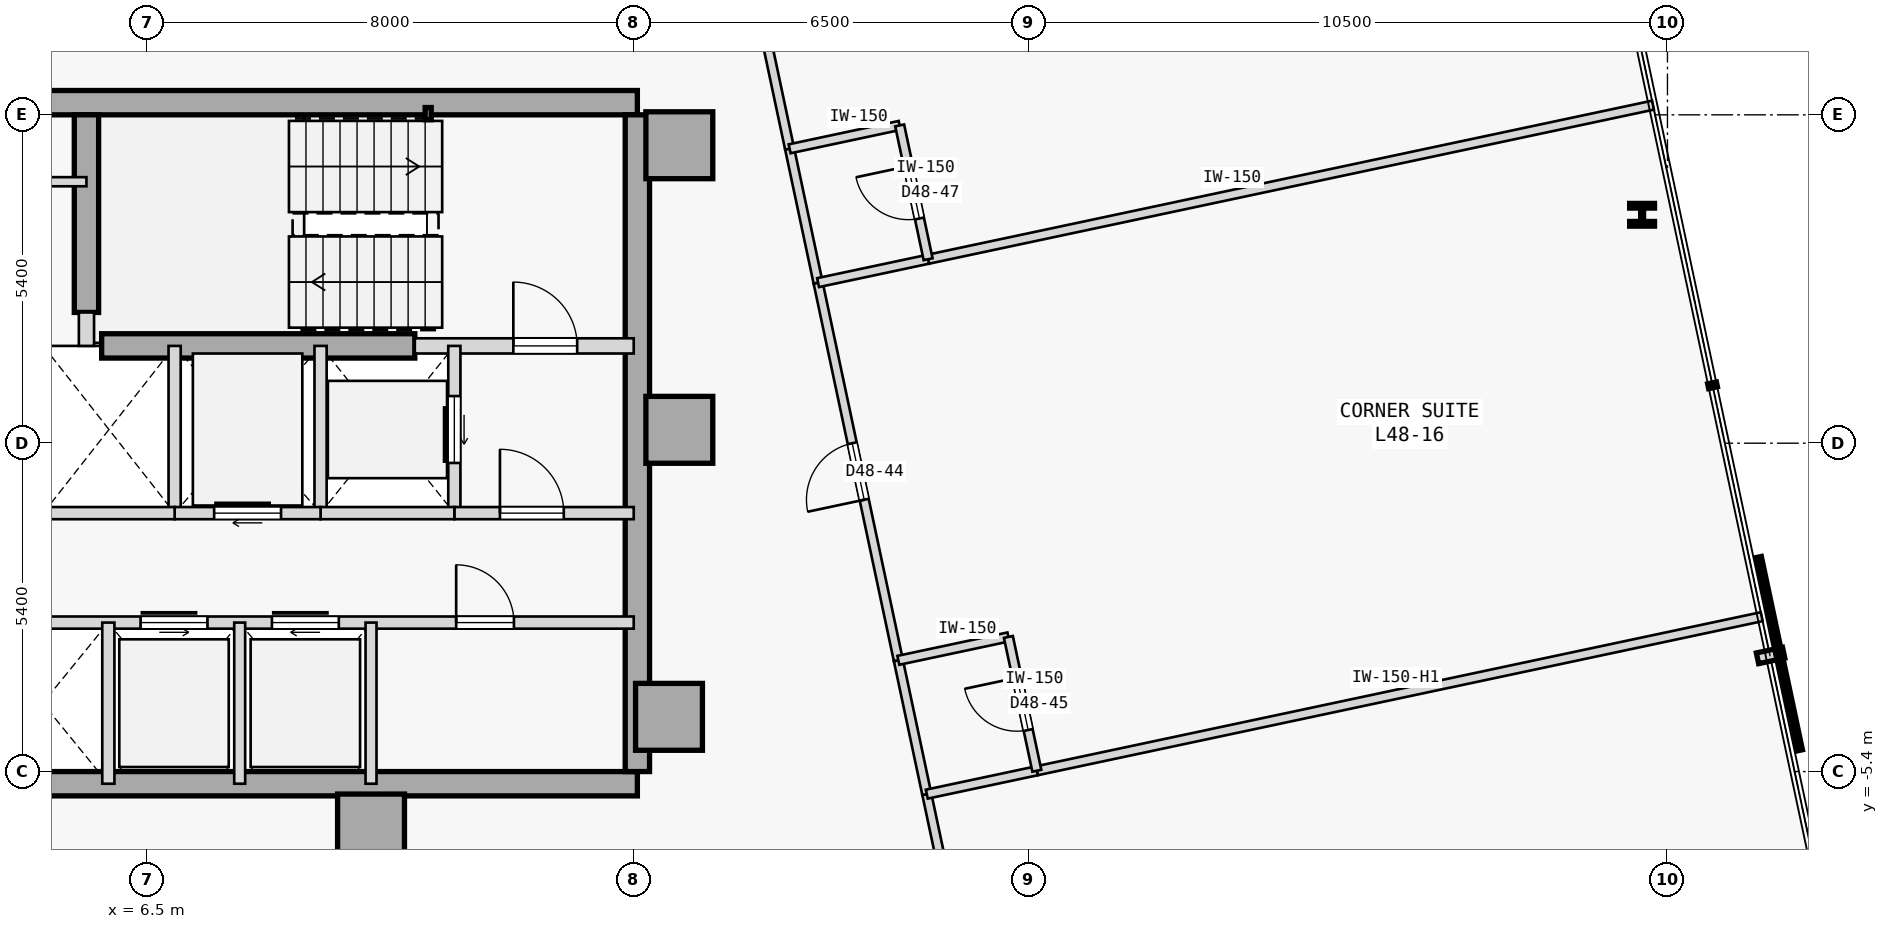
"""IFC4 building model, lengths in metres.
Left out: names, types, materials, properties, quantities, classifications, styles, units other than length and angle.
Written with IfcOpenShell. Run it as: python <this file> out.ifc"""

import sys

from ifc_helpers import new_model, si_unit, direction, frame, frame_2d, origin, origin_2d, place, context, subcontext, project, spatial, rectangle, hollow_rectangle, i_section, extrude, element, fill, save


model = new_model("IFC4")
c1 = context("Model", 3, precision=1e-05, world=origin(), true_north=direction((0.0, 1.0)))
c2 = subcontext(c1, "Body", "Model", "MODEL_VIEW")
j1 = project(units=[si_unit("LENGTHUNIT", "METRE"), si_unit("PLANEANGLEUNIT", "RADIAN")], contexts=[c1])
p1 = place(None, origin())
s1 = spatial("IfcSite", under=j1, at=p1, CompositionType="ELEMENT")
p2 = place(p1, origin())
s2 = spatial("IfcBuilding", under=s1, at=p2, CompositionType="ELEMENT")
p3 = place(p2, frame((0.0, 0.0, 185.4)))
s3 = spatial("IfcBuildingStorey", under=s2, at=p3, CompositionType="ELEMENT", Elevation=185.4)
for number, where, z_axis, x_axis in (
    (1, (15.25, 4.9, 0.0), (0.0, 0.0, 1.0), (1.0, 0.0, 0.0)),
    (2, (15.25, 0.22, 0.0), (0.0, 0.0, 1.0), (1.0, 0.0, 0.0)),
    (3, (15.08, -4.5, 0.0), (0.0, 0.0, 1.0), (1.0, 0.0, 0.0)),
    (4, (10.18, -6.32, 0.0), (0.0, 0.0, 1.0), (1.0, 0.0, 0.0)),
):
    element("IfcColumn", number, at=place(p3, frame(where, z_axis=z_axis, x_axis=x_axis)), inside=s3, PredefinedType="COLUMN", context=c2, shape_type="SweptSolid", body=[
        extrude(rectangle(XDim=1.1, YDim=1.1, at=origin_2d()), origin(), (0.0, 0.0, 1.0), 3.4),
    ])
p4 = place(p3, frame((3.15, 5.6, 0.0), z_axis=(0.0, 0.0, 1.0), x_axis=(1.0, 0.0, 0.0)))
e5 = element("IfcWall", 5, at=p4, inside=s3, PredefinedType="SHEAR", context=c2, shape_type="SweptSolid", body=[
    extrude(rectangle(XDim=11.41, YDim=0.4, at=frame_2d((5.705, 0.0))), origin(), (0.0, 0.0, 1.0), 3.175),
])
p5 = place(p3, frame((3.7, -5.6, 0.0), z_axis=(0.0, 0.0, 1.0), x_axis=(1.0, 0.0, 0.0)))
e6 = element("IfcWall", 6, at=p5, inside=s3, PredefinedType="SHEAR", context=c2, shape_type="SweptSolid", body=[
    extrude(rectangle(XDim=10.86, YDim=0.4, at=frame_2d((5.43, 0.0))), origin(), (0.0, 0.0, 1.0), 3.175),
])
p6 = place(p3, frame((14.56, -5.4, 0.0), z_axis=(0.0, 0.0, 1.0), x_axis=(0.0, 1.0, 0.0)))
e7 = element("IfcWall", 7, at=p6, inside=s3, PredefinedType="SHEAR", context=c2, shape_type="SweptSolid", body=[
    extrude(rectangle(XDim=10.8, YDim=0.4, at=frame_2d((5.4, 0.0))), origin(), (0.0, 0.0, 1.0), 3.175),
])
p7 = place(p3, frame((5.5, 2.15, 0.0), z_axis=(0.0, 0.0, 1.0), x_axis=(0.0, 1.0, 0.0)))
e8 = element("IfcWall", 8, at=p7, inside=s3, PredefinedType="SHEAR", context=c2, shape_type="SweptSolid", body=[
    extrude(rectangle(XDim=3.25, YDim=0.4, at=frame_2d((1.625, 0.0))), origin(), (0.0, 0.0, 1.0), 3.175),
])
p8 = place(p3, frame((5.75, 1.6, 0.0), z_axis=(0.0, 0.0, 1.0), x_axis=(1.0, 0.0, 0.0)))
e9 = element("IfcWall", 9, at=p8, inside=s3, PredefinedType="SHEAR", context=c2, shape_type="SweptSolid", body=[
    extrude(rectangle(XDim=5.15, YDim=0.4, at=frame_2d((2.575, 0.0))), origin(), (0.0, 0.0, 1.0), 3.175),
])
p9 = place(p3, frame((11.12, 5.42, 0.0), z_axis=(0.0, 0.0, 1.0), x_axis=(1.0, 0.0, 0.0)))
e10 = element("IfcColumn", 10, at=p9, inside=s3, PredefinedType="COLUMN", context=c2, shape_type="SweptSolid", body=[
    extrude(hollow_rectangle(XDim=0.1, YDim=0.2, WallThickness=0.008, at=origin_2d()), origin(), (0.0, 0.0, 1.0), 3.4),
])
p10 = place(p3, frame((31.083, 3.756, 0.0), z_axis=(0.0, 0.0, 1.0), x_axis=(1.0, 0.0, 0.0)))
e11 = element("IfcColumn", 11, at=p10, inside=s3, PredefinedType="COLUMN", context=c2, shape_type="SweptSolid", body=[
    extrude(i_section(OverallWidth=0.409, OverallDepth=0.374, WebThickness=0.048, FlangeThickness=0.077, FilletRadius=0.015, at=origin_2d()), origin(), (0.0, 0.0, 1.0), 3.4),
])
p11 = place(p3, frame((10.9, 1.6, 0.0), z_axis=(0.0, 0.0, 1.0), x_axis=(1.0, 0.0, 0.0)))
e12 = element("IfcWall", 12, at=p11, inside=s3, PredefinedType="STANDARD", context=c2, shape_type="SweptSolid", body=[
    extrude(rectangle(XDim=3.6, YDim=0.25, at=frame_2d((1.8, 0.0))), origin(), (0.0, 0.0, 1.0), 3.175),
])
p12 = place(p11, frame((1.62, 0.0, 0.0)))
e13 = element("IfcOpeningElement", 13, at=p12, cuts=e12, PredefinedType="OPENING", context=c2, shape_type="SweptSolid", body=[
    extrude(rectangle(XDim=1.05, YDim=2.15, at=frame_2d((0.525, 1.075))), frame((0.0, 0.135, 0.0), z_axis=(0.0, -1.0, 0.0), x_axis=(1.0, 0.0, 0.0)), (0.0, 0.0, 1.0), 0.27),
])
p13 = place(p3, frame((5.5, 1.6, 0.0), z_axis=(0.0, 0.0, 1.0), x_axis=(0.0, 1.0, 0.0)))
e14 = element("IfcWall", 14, at=p13, inside=s3, PredefinedType="STANDARD", context=c2, shape_type="SweptSolid", body=[
    extrude(rectangle(XDim=0.55, YDim=0.25, at=frame_2d((0.275, 0.0))), origin(), (0.0, 0.0, 1.0), 3.175),
])
p14 = place(p3, frame((11.55, -1.15, 0.0), z_axis=(0.0, 0.0, 1.0), x_axis=(0.0, 1.0, 0.0)))
e15 = element("IfcWall", 15, at=p14, inside=s3, PredefinedType="STANDARD", context=c2, shape_type="SweptSolid", body=[
    extrude(rectangle(XDim=2.75, YDim=0.2, at=frame_2d((1.375, 0.0))), origin(), (0.0, 0.0, 1.0), 3.175),
])
p15 = place(p14, frame((0.825, 0.0, 0.0)))
e16 = element("IfcOpeningElement", 16, at=p15, cuts=e15, PredefinedType="OPENING", context=c2, shape_type="SweptSolid", body=[
    extrude(rectangle(XDim=1.1, YDim=2.15, at=frame_2d((0.55, 1.075))), frame((0.0, 0.11, 0.0), z_axis=(0.0, -1.0, 0.0), x_axis=(1.0, 0.0, 0.0)), (0.0, 0.0, 1.0), 0.22),
])
p16 = place(p3, frame((9.35, -1.15, 0.0), z_axis=(0.0, 0.0, 1.0), x_axis=(0.0, 1.0, 0.0)))
e17 = element("IfcWall", 17, at=p16, inside=s3, PredefinedType="STANDARD", context=c2, shape_type="SweptSolid", body=[
    extrude(rectangle(XDim=2.75, YDim=0.2, at=frame_2d((1.375, 0.0))), origin(), (0.0, 0.0, 1.0), 3.175),
])
p17 = place(p3, frame((11.55, -1.15, 0.0), z_axis=(0.0, 0.0, 1.0), x_axis=(1.0, 0.0, 0.0)))
e18 = element("IfcWall", 18, at=p17, inside=s3, PredefinedType="STANDARD", context=c2, shape_type="SweptSolid", body=[
    extrude(rectangle(XDim=2.95, YDim=0.2, at=frame_2d((1.475, 0.0))), origin(), (0.0, 0.0, 1.0), 3.175),
])
p18 = place(p17, frame((0.75, 0.0, 0.0)))
e19 = element("IfcOpeningElement", 19, at=p18, cuts=e18, PredefinedType="OPENING", context=c2, shape_type="SweptSolid", body=[
    extrude(rectangle(XDim=1.05, YDim=2.18, at=frame_2d((0.525, 1.09))), frame((0.0, 0.11, 0.0), z_axis=(0.0, -1.0, 0.0), x_axis=(1.0, 0.0, 0.0)), (0.0, 0.0, 1.0), 0.22),
])
p19 = place(p3, frame((9.35, -1.15, 0.0), z_axis=(0.0, 0.0, 1.0), x_axis=(1.0, 0.0, 0.0)))
e20 = element("IfcWall", 20, at=p19, inside=s3, PredefinedType="STANDARD", context=c2, shape_type="SweptSolid", body=[
    extrude(rectangle(XDim=2.2, YDim=0.2, at=frame_2d((1.1, 0.0))), origin(), (0.0, 0.0, 1.0), 3.175),
])
p20 = place(p3, frame((6.95, -1.15, 0.0), z_axis=(0.0, 0.0, 1.0), x_axis=(0.0, 1.0, 0.0)))
e21 = element("IfcWall", 21, at=p20, inside=s3, PredefinedType="STANDARD", context=c2, shape_type="SweptSolid", body=[
    extrude(rectangle(XDim=2.75, YDim=0.2, at=frame_2d((1.375, 0.0))), origin(), (0.0, 0.0, 1.0), 3.175),
])
p21 = place(p3, frame((6.95, -1.15, 0.0), z_axis=(0.0, 0.0, 1.0), x_axis=(1.0, 0.0, 0.0)))
e22 = element("IfcWall", 22, at=p21, inside=s3, PredefinedType="STANDARD", context=c2, shape_type="SweptSolid", body=[
    extrude(rectangle(XDim=2.4, YDim=0.2, at=frame_2d((1.2, 0.0))), origin(), (0.0, 0.0, 1.0), 3.175),
])
p22 = place(p21, frame((0.65, 0.0, 0.0)))
e23 = element("IfcOpeningElement", 23, at=p22, cuts=e22, PredefinedType="OPENING", context=c2, shape_type="SweptSolid", body=[
    extrude(rectangle(XDim=1.1, YDim=2.15, at=frame_2d((0.55, 1.075))), frame((0.0, 0.11, 0.0), z_axis=(0.0, -1.0, 0.0), x_axis=(1.0, 0.0, 0.0)), (0.0, 0.0, 1.0), 0.22),
])
p23 = place(p3, frame((4.79, -1.15, 0.0), z_axis=(0.0, 0.0, 1.0), x_axis=(1.0, 0.0, 0.0)))
e24 = element("IfcWall", 24, at=p23, inside=s3, PredefinedType="STANDARD", context=c2, shape_type="SweptSolid", body=[
    extrude(rectangle(XDim=2.16, YDim=0.2, at=frame_2d((1.08, 0.0))), origin(), (0.0, 0.0, 1.0), 3.175),
])
p24 = place(p3, frame((3.7, -2.95, 0.0), z_axis=(0.0, 0.0, 1.0), x_axis=(1.0, 0.0, 0.0)))
e25 = element("IfcWall", 25, at=p24, inside=s3, PredefinedType="STANDARD", context=c2, shape_type="SweptSolid", body=[
    extrude(rectangle(XDim=10.8, YDim=0.2, at=frame_2d((5.4, 0.0))), origin(), (0.0, 0.0, 1.0), 3.175),
])
p25 = place(p24, frame((2.69, 0.0, 0.0)))
e26 = element("IfcOpeningElement", 26, at=p25, cuts=e25, PredefinedType="OPENING", context=c2, shape_type="SweptSolid", body=[
    extrude(rectangle(XDim=1.1, YDim=2.15, at=frame_2d((0.55, 1.075))), frame((0.0, 0.11, 0.0), z_axis=(0.0, -1.0, 0.0), x_axis=(1.0, 0.0, 0.0)), (0.0, 0.0, 1.0), 0.22),
])
p26 = place(p24, frame((4.85, 0.0, 0.0)))
e27 = element("IfcOpeningElement", 27, at=p26, cuts=e25, PredefinedType="OPENING", context=c2, shape_type="SweptSolid", body=[
    extrude(rectangle(XDim=1.1, YDim=2.15, at=frame_2d((0.55, 1.075))), frame((0.0, 0.11, 0.0), z_axis=(0.0, -1.0, 0.0), x_axis=(1.0, 0.0, 0.0)), (0.0, 0.0, 1.0), 0.22),
])
p27 = place(p24, frame((7.88, 0.0, 0.0)))
e28 = element("IfcOpeningElement", 28, at=p27, cuts=e25, PredefinedType="OPENING", context=c2, shape_type="SweptSolid", body=[
    extrude(rectangle(XDim=0.95, YDim=2.15, at=frame_2d((0.475, 1.075))), frame((0.0, 0.11, 0.0), z_axis=(0.0, -1.0, 0.0), x_axis=(1.0, 0.0, 0.0)), (0.0, 0.0, 1.0), 0.22),
])
p28 = place(p3, frame((5.86, -5.6, 0.0), z_axis=(0.0, 0.0, 1.0), x_axis=(0.0, 1.0, 0.0)))
e29 = element("IfcWall", 29, at=p28, inside=s3, PredefinedType="STANDARD", context=c2, shape_type="SweptSolid", body=[
    extrude(rectangle(XDim=2.65, YDim=0.2, at=frame_2d((1.325, 0.0))), origin(), (0.0, 0.0, 1.0), 3.175),
])
for number, where, z_axis, x_axis in (
    (30, (10.18, -5.6, 0.0), (0.0, 0.0, 1.0), (0.0, 1.0, 0.0)),
    (31, (8.02, -5.6, 0.0), (0.0, 0.0, 1.0), (0.0, 1.0, 0.0)),
):
    element("IfcWall", number, at=place(p3, frame(where, z_axis=z_axis, x_axis=x_axis)), inside=s3, PredefinedType="STANDARD", context=c2, shape_type="SweptSolid", body=[
        extrude(rectangle(XDim=2.65, YDim=0.18, at=frame_2d((1.325, 0.0))), origin(), (0.0, 0.0, 1.0), 3.175),
    ])
p29 = place(p3, frame((3.7, 4.3, 0.0), z_axis=(0.0, 0.0, 1.0), x_axis=(1.0, 0.0, 0.0)))
e32 = element("IfcWall", 32, at=p29, inside=s3, PredefinedType="PARTITIONING", context=c2, shape_type="SweptSolid", body=[
    extrude(rectangle(XDim=1.8, YDim=0.15, at=frame_2d((0.9, 0.0))), origin(), (0.0, 0.0, 1.0), 3.175),
])
p30 = place(p3, frame((20.328, -10.515, 0.0), z_axis=(0.0, 0.0, 1.0), x_axis=(-0.207950868925, 0.97813927235, 0.0)))
e33 = element("IfcWall", 33, at=p30, inside=s3, PredefinedType="PARTITIONING", context=c2, shape_type="SweptSolid", body=[
    extrude(rectangle(XDim=4.85, YDim=0.15, at=frame_2d((2.425, 0.0))), origin(), (0.0, 0.0, 1.0), 3.175),
])
p31 = place(p30, frame((1.95, 0.0, 0.0)))
e34 = element("IfcOpeningElement", 34, at=p31, cuts=e33, PredefinedType="OPENING", context=c2, shape_type="SweptSolid", body=[
    extrude(rectangle(XDim=0.95, YDim=2.15, at=frame_2d((0.475, 1.075))), frame((0.0, 0.085, 0.0), z_axis=(0.0, -1.0, 0.0), x_axis=(1.0, 0.0, 0.0)), (0.0, 0.0, 1.0), 0.17),
])
p32 = place(p3, frame((18.852, -3.571, 0.0), z_axis=(0.0, 0.0, 1.0), x_axis=(-0.207879907349, 0.978154355979, 0.0)))
e35 = element("IfcWall", 35, at=p32, inside=s3, PredefinedType="PARTITIONING", context=c2, shape_type="SweptSolid", body=[
    extrude(rectangle(XDim=6.35, YDim=0.15, at=frame_2d((3.175, 0.0))), origin(), (0.0, 0.0, 1.0), 3.175),
])
p33 = place(p32, frame((2.7, 0.0, 0.0)))
e36 = element("IfcOpeningElement", 36, at=p33, cuts=e35, PredefinedType="OPENING", context=c2, shape_type="SweptSolid", body=[
    extrude(rectangle(XDim=0.95, YDim=2.15, at=frame_2d((0.475, 1.075))), frame((0.0, 0.085, 0.0), z_axis=(0.0, -1.0, 0.0), x_axis=(1.0, 0.0, 0.0)), (0.0, 0.0, 1.0), 0.17),
])
p34 = place(p3, frame((19.32, -5.771, 0.0), z_axis=(0.0, 0.0, 1.0), x_axis=(-0.207913264065, 0.978147266328, 0.0)))
e37 = element("IfcWall", 37, at=p34, inside=s3, PredefinedType="PARTITIONING", context=c2, shape_type="SweptSolid", body=[
    extrude(rectangle(XDim=2.25, YDim=0.15, at=frame_2d((1.125, 0.0))), origin(), (0.0, 0.0, 1.0), 3.175),
])
p35 = place(p3, frame((17.064, 4.841, 0.0), z_axis=(0.0, 0.0, 1.0), x_axis=(-0.207924511115, 0.978144875608, 0.0)))
e38 = element("IfcWall", 38, at=p35, inside=s3, PredefinedType="PARTITIONING", context=c2, shape_type="SweptSolid", body=[
    extrude(rectangle(XDim=6.35, YDim=0.15, at=frame_2d((3.175, 0.0))), origin(), (0.0, 0.0, 1.0), 3.175),
])
p36 = place(p35, frame((2.7, 0.0, 0.0)))
e39 = element("IfcOpeningElement", 39, at=p36, cuts=e38, PredefinedType="OPENING", context=c2, shape_type="SweptSolid", body=[
    extrude(rectangle(XDim=0.95, YDim=2.15, at=frame_2d((0.475, 1.075))), frame((0.0, 0.085, 0.0), z_axis=(0.0, -1.0, 0.0), x_axis=(1.0, 0.0, 0.0)), (0.0, 0.0, 1.0), 0.17),
])
p37 = place(p3, frame((17.532, 2.641, 0.0), z_axis=(0.0, 0.0, 1.0), x_axis=(-0.207913264065, 0.978147266328, 0.0)))
e40 = element("IfcWall", 40, at=p37, inside=s3, PredefinedType="PARTITIONING", context=c2, shape_type="SweptSolid", body=[
    extrude(rectangle(XDim=2.25, YDim=0.15, at=frame_2d((1.125, 0.0))), origin(), (0.0, 0.0, 1.0), 3.175),
])
p38 = place(p3, frame((21.129, -5.387, 0.0), z_axis=(0.0, 0.0, 1.0), x_axis=(0.97814556055, 0.207921288896, 0.0)))
e41 = element("IfcWall", 41, at=p38, inside=s3, PredefinedType="PARTITIONING", context=c2, shape_type="SweptSolid", body=[
    extrude(rectangle(XDim=12.187, YDim=0.15, at=frame_2d((6.094, 0.0))), origin(), (0.0, 0.0, 1.0), 2.725),
])
p39 = place(p3, frame((19.32, -5.771, 0.0), z_axis=(0.0, 0.0, 1.0), x_axis=(0.978165892835, 0.207825614625, 0.0)))
e42 = element("IfcWall", 42, at=p39, inside=s3, PredefinedType="PARTITIONING", context=c2, shape_type="SweptSolid", body=[
    extrude(rectangle(XDim=1.85, YDim=0.15, at=frame_2d((0.925, 0.0))), origin(), (0.0, 0.0, 1.0), 3.175),
])
p40 = place(p3, frame((18.852, -3.571, 0.0), z_axis=(0.0, 0.0, 1.0), x_axis=(0.978139061018, 0.207951862966, 0.0)))
e43 = element("IfcWall", 43, at=p40, inside=s3, PredefinedType="PARTITIONING", context=c2, shape_type="SweptSolid", body=[
    extrude(rectangle(XDim=1.85, YDim=0.15, at=frame_2d((0.925, 0.0))), origin(), (0.0, 0.0, 1.0), 3.175),
])
p41 = place(p3, frame((21.129, -5.387, 0.0), z_axis=(0.0, 0.0, 1.0), x_axis=(-0.207891197838, 0.978151956427, 0.0)))
e44 = element("IfcWall", 44, at=p41, inside=s3, PredefinedType="PARTITIONING", context=c2, shape_type="SweptSolid", body=[
    extrude(rectangle(XDim=2.25, YDim=0.15, at=frame_2d((1.125, 0.0))), origin(), (0.0, 0.0, 1.0), 3.175),
])
p42 = place(p41, frame((0.685, 0.0, 0.0)))
e45 = element("IfcOpeningElement", 45, at=p42, cuts=e44, PredefinedType="OPENING", context=c2, shape_type="SweptSolid", body=[
    extrude(rectangle(XDim=0.88, YDim=2.15, at=frame_2d((0.44, 1.075))), frame((0.0, 0.085, 0.0), z_axis=(0.0, -1.0, 0.0), x_axis=(1.0, 0.0, 0.0)), (0.0, 0.0, 1.0), 0.17),
])
p43 = place(p3, frame((19.341, 3.025, 0.0), z_axis=(0.0, 0.0, 1.0), x_axis=(0.97814556055, 0.207921288896, 0.0)))
e46 = element("IfcWall", 46, at=p43, inside=s3, PredefinedType="PARTITIONING", context=c2, shape_type="SweptSolid", body=[
    extrude(rectangle(XDim=12.187, YDim=0.15, at=frame_2d((6.094, 0.0))), origin(), (0.0, 0.0, 1.0), 3.175),
])
p44 = place(p3, frame((17.532, 2.641, 0.0), z_axis=(0.0, 0.0, 1.0), x_axis=(0.978160192495, 0.207852442415, 0.0)))
e47 = element("IfcWall", 47, at=p44, inside=s3, PredefinedType="PARTITIONING", context=c2, shape_type="SweptSolid", body=[
    extrude(rectangle(XDim=1.85, YDim=0.15, at=frame_2d((0.925, 0.0))), origin(), (0.0, 0.0, 1.0), 3.175),
])
p45 = place(p3, frame((17.064, 4.841, 0.0), z_axis=(0.0, 0.0, 1.0), x_axis=(0.978133353907, 0.20797870558, 0.0)))
e48 = element("IfcWall", 48, at=p45, inside=s3, PredefinedType="PARTITIONING", context=c2, shape_type="SweptSolid", body=[
    extrude(rectangle(XDim=1.85, YDim=0.15, at=frame_2d((0.925, 0.0))), origin(), (0.0, 0.0, 1.0), 3.175),
])
p46 = place(p3, frame((19.341, 3.025, 0.0), z_axis=(0.0, 0.0, 1.0), x_axis=(-0.207891197838, 0.978151956427, 0.0)))
e49 = element("IfcWall", 49, at=p46, inside=s3, PredefinedType="PARTITIONING", context=c2, shape_type="SweptSolid", body=[
    extrude(rectangle(XDim=2.25, YDim=0.15, at=frame_2d((1.125, 0.0))), origin(), (0.0, 0.0, 1.0), 3.175),
])
p47 = place(p46, frame((0.685, 0.0, 0.0)))
e50 = element("IfcOpeningElement", 50, at=p47, cuts=e49, PredefinedType="OPENING", context=c2, shape_type="SweptSolid", body=[
    extrude(rectangle(XDim=0.88, YDim=2.15, at=frame_2d((0.44, 1.075))), frame((0.0, 0.085, 0.0), z_axis=(0.0, -1.0, 0.0), x_axis=(1.0, 0.0, 0.0)), (0.0, 0.0, 1.0), 0.17),
])
p48 = place(p12, origin())
e51 = element("IfcDoor", 51, at=p48, inside=s3, OperationType="SINGLE_SWING_LEFT", PredefinedType="DOOR", context=c2, shape_type="SweptSolid", body=[
    extrude(rectangle(XDim=1.05, YDim=2.15, at=frame_2d((0.525, 1.075))), frame((0.0, 0.025, 0.0), z_axis=(0.0, -1.0, 0.0), x_axis=(1.0, 0.0, 0.0)), (0.0, 0.0, 1.0), 0.05),
])
fill(e13, e51)
p49 = place(p18, origin())
e52 = element("IfcDoor", 52, at=p49, inside=s3, OperationType="SINGLE_SWING_LEFT", PredefinedType="DOOR", context=c2, shape_type="SweptSolid", body=[
    extrude(rectangle(XDim=1.05, YDim=2.18, at=frame_2d((0.525, 1.09))), frame((0.0, 0.025, 0.0), z_axis=(0.0, -1.0, 0.0), x_axis=(1.0, 0.0, 0.0)), (0.0, 0.0, 1.0), 0.05),
])
fill(e19, e52)
p50 = place(p15, origin())
e53 = element("IfcDoor", 53, at=p50, inside=s3, OperationType="SLIDING_TO_RIGHT", PredefinedType="DOOR", context=c2, shape_type="SweptSolid", body=[
    extrude(rectangle(XDim=1.1, YDim=2.15, at=frame_2d((0.55, 1.075))), frame((0.0, 0.025, 0.0), z_axis=(0.0, -1.0, 0.0), x_axis=(1.0, 0.0, 0.0)), (0.0, 0.0, 1.0), 0.05),
])
fill(e16, e53)
p51 = place(p22, origin())
e54 = element("IfcDoor", 54, at=p51, inside=s3, OperationType="SLIDING_TO_RIGHT", PredefinedType="DOOR", context=c2, shape_type="SweptSolid", body=[
    extrude(rectangle(XDim=1.1, YDim=2.15, at=frame_2d((0.55, 1.075))), frame((0.0, 0.025, 0.0), z_axis=(0.0, -1.0, 0.0), x_axis=(1.0, 0.0, 0.0)), (0.0, 0.0, 1.0), 0.05),
])
fill(e23, e54)
p52 = place(p25, origin())
e55 = element("IfcDoor", 55, at=p52, inside=s3, OperationType="SLIDING_TO_LEFT", PredefinedType="DOOR", context=c2, shape_type="SweptSolid", body=[
    extrude(rectangle(XDim=1.1, YDim=2.15, at=frame_2d((0.55, 1.075))), frame((0.0, 0.025, 0.0), z_axis=(0.0, -1.0, 0.0), x_axis=(1.0, 0.0, 0.0)), (0.0, 0.0, 1.0), 0.05),
])
fill(e26, e55)
p53 = place(p26, origin())
e56 = element("IfcDoor", 56, at=p53, inside=s3, OperationType="SLIDING_TO_RIGHT", PredefinedType="DOOR", context=c2, shape_type="SweptSolid", body=[
    extrude(rectangle(XDim=1.1, YDim=2.15, at=frame_2d((0.55, 1.075))), frame((0.0, 0.025, 0.0), z_axis=(0.0, -1.0, 0.0), x_axis=(1.0, 0.0, 0.0)), (0.0, 0.0, 1.0), 0.05),
])
fill(e27, e56)
p54 = place(p27, origin())
e57 = element("IfcDoor", 57, at=p54, inside=s3, OperationType="SINGLE_SWING_LEFT", PredefinedType="DOOR", context=c2, shape_type="SweptSolid", body=[
    extrude(rectangle(XDim=0.95, YDim=2.15, at=frame_2d((0.475, 1.075))), frame((0.0, 0.025, 0.0), z_axis=(0.0, -1.0, 0.0), x_axis=(1.0, 0.0, 0.0)), (0.0, 0.0, 1.0), 0.05),
])
fill(e28, e57)
p55 = place(p33, origin())
e58 = element("IfcDoor", 58, at=p55, inside=s3, OperationType="SINGLE_SWING_LEFT", PredefinedType="DOOR", context=c2, shape_type="SweptSolid", body=[
    extrude(rectangle(XDim=0.95, YDim=2.15, at=frame_2d((0.475, 1.075))), frame((0.0, 0.025, 0.0), z_axis=(0.0, -1.0, 0.0), x_axis=(1.0, 0.0, 0.0)), (0.0, 0.0, 1.0), 0.05),
])
fill(e36, e58)
p56 = place(p42, origin())
e59 = element("IfcDoor", 59, at=p56, inside=s3, OperationType="SINGLE_SWING_RIGHT", PredefinedType="DOOR", context=c2, shape_type="SweptSolid", body=[
    extrude(rectangle(XDim=0.88, YDim=2.15, at=frame_2d((0.44, 1.075))), frame((0.0, 0.025, 0.0), z_axis=(0.0, -1.0, 0.0), x_axis=(1.0, 0.0, 0.0)), (0.0, 0.0, 1.0), 0.05),
])
fill(e45, e59)
p57 = place(p47, origin())
e60 = element("IfcDoor", 60, at=p57, inside=s3, OperationType="SINGLE_SWING_RIGHT", PredefinedType="DOOR", context=c2, shape_type="SweptSolid", body=[
    extrude(rectangle(XDim=0.88, YDim=2.15, at=frame_2d((0.44, 1.075))), frame((0.0, 0.025, 0.0), z_axis=(0.0, -1.0, 0.0), x_axis=(1.0, 0.0, 0.0)), (0.0, 0.0, 1.0), 0.05),
])
fill(e50, e60)
save(model, sys.argv[1])
